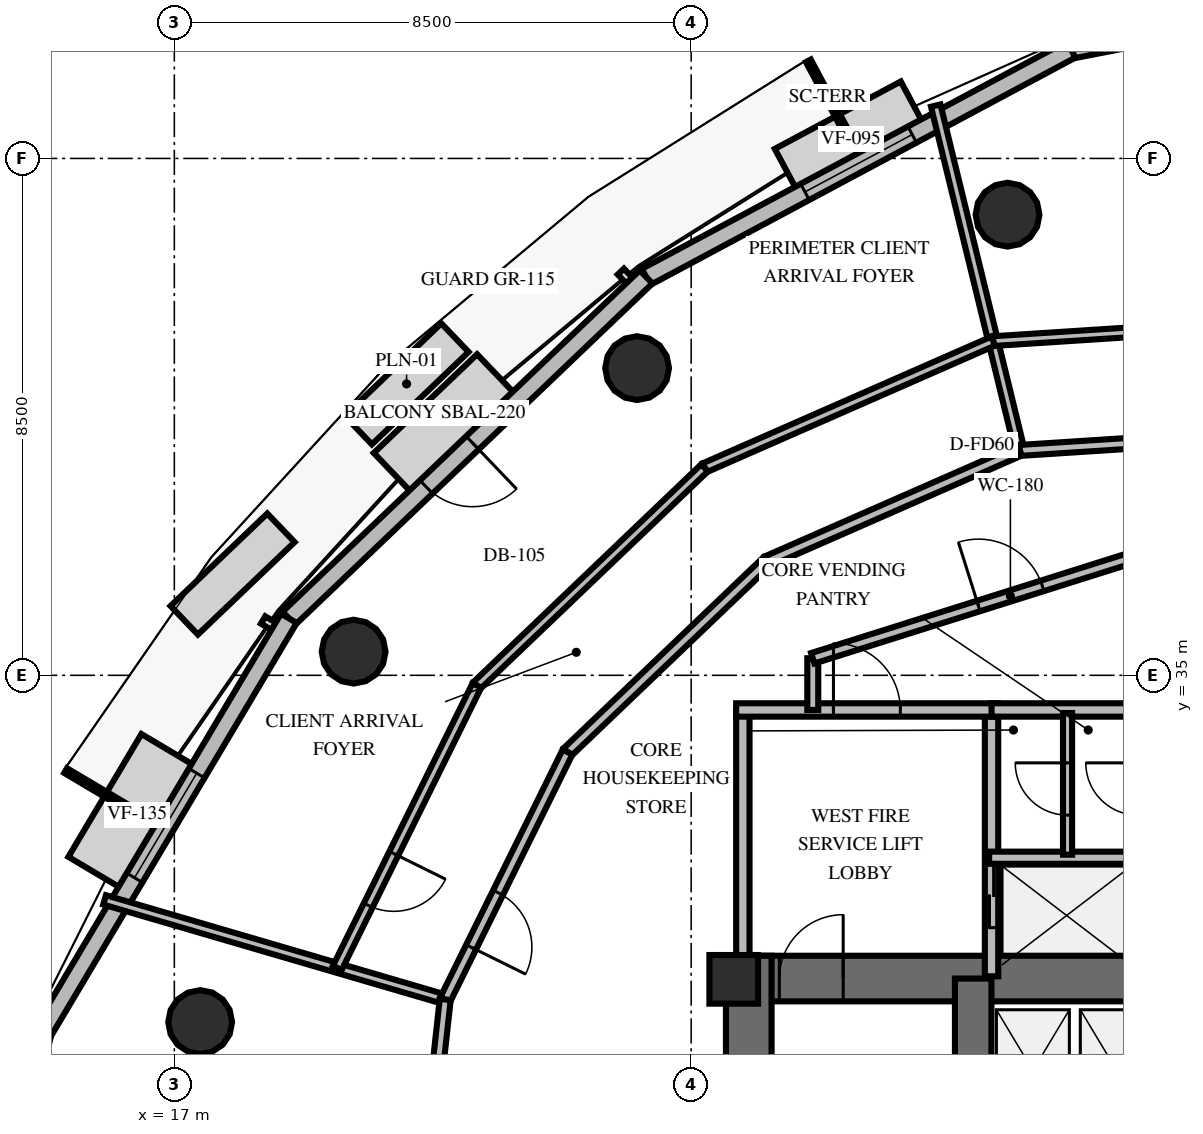
"""IFC4 building model, lengths in metres.
Left out: names, types, materials, properties, quantities, classifications, styles, units other than length and angle.
Written with IfcOpenShell. Run it as: python <this file> out.ifc"""

import sys

from ifc_helpers import new_model, si_unit, direction, frame, frame_2d, origin, origin_2d, place, context, subcontext, project, spatial, rectangle, circle, extrude, element, fill, save


model = new_model("IFC4")
c1 = context("Model", 3, precision=1e-05, world=origin(), true_north=direction((0.0, 1.0)))
c2 = subcontext(c1, "Body", "Model", "MODEL_VIEW")
j1 = project(units=[si_unit("LENGTHUNIT", "METRE"), si_unit("PLANEANGLEUNIT", "RADIAN")], contexts=[c1])
p1 = place(None, origin())
s1 = spatial("IfcSite", under=j1, at=p1, CompositionType="ELEMENT")
p2 = place(p1, origin())
s2 = spatial("IfcBuilding", under=s1, at=p2, CompositionType="ELEMENT")
p3 = place(p2, frame((0.0, 0.0, 213.2)))
s3 = spatial("IfcBuildingStorey", under=s2, at=p3, CompositionType="ELEMENT", Elevation=213.2)
p4 = place(p3, frame((26.072, 30.013, 0.0), z_axis=(0.0, 0.0, 1.0), x_axis=(1.0, 0.0, 0.0)))
e1 = element("IfcWall", 1, at=p4, inside=s3, PredefinedType="SHEAR", context=c2, shape_type="SweptSolid", body=[
    extrude(rectangle(XDim=15.866, YDim=0.75, at=frame_2d((7.933, 0.0))), origin(), (0.0, 0.0, 1.0), 3.6),
])
p5 = place(p4, frame((0.878, 0.0, 0.0)))
e2 = element("IfcOpeningElement", 2, at=p5, cuts=e1, PredefinedType="OPENING", context=c2, shape_type="SweptSolid", body=[
    extrude(rectangle(XDim=1.05, YDim=2.15, at=frame_2d((0.525, 1.075))), frame((0.0, 0.385, 0.0), z_axis=(0.0, -1.0, 0.0), x_axis=(1.0, 0.0, 0.0)), (0.0, 0.0, 1.0), 0.77),
])
p6 = place(p4, frame((13.928, 0.0, 0.0)))
e3 = element("IfcOpeningElement", 3, at=p6, cuts=e1, PredefinedType="OPENING", context=c2, shape_type="SweptSolid", body=[
    extrude(rectangle(XDim=1.05, YDim=2.15, at=frame_2d((0.525, 1.075))), frame((0.0, 0.385, 0.0), z_axis=(0.0, -1.0, 0.0), x_axis=(1.0, 0.0, 0.0)), (0.0, 0.0, 1.0), 0.77),
])
p7 = place(p4, frame((7.378, 0.0, 0.0)))
e4 = element("IfcOpeningElement", 4, at=p7, cuts=e1, PredefinedType="OPENING", context=c2, shape_type="SweptSolid", body=[
    extrude(rectangle(XDim=1.1, YDim=2.15, at=frame_2d((0.55, 1.075))), frame((0.0, 0.385, 0.0), z_axis=(0.0, -1.0, 0.0), x_axis=(1.0, 0.0, 0.0)), (0.0, 0.0, 1.0), 0.77),
])
p8 = place(p3, frame((26.447, 19.812, 0.0), z_axis=(0.0, 0.0, 1.0), x_axis=(0.0, 1.0, 0.0)))
e5 = element("IfcWall", 5, at=p8, inside=s3, PredefinedType="SHEAR", context=c2, shape_type="SweptSolid", body=[
    extrude(rectangle(XDim=10.576, YDim=0.75, at=frame_2d((5.288, 0.0))), origin(), (0.0, 0.0, 1.0), 3.6),
])
p9 = place(p3, frame((30.138, 20.187, 0.0), z_axis=(0.0, 0.0, 1.0), x_axis=(0.0, 1.0, 0.0)))
e6 = element("IfcWall", 6, at=p9, inside=s3, PredefinedType="SHEAR", context=c2, shape_type="SweptSolid", body=[
    extrude(rectangle(XDim=9.826, YDim=0.6, at=frame_2d((4.913, 0.0))), origin(), (0.0, 0.0, 1.0), 3.6),
])
p10 = place(p3, frame((26.2, 30.0, 0.0), z_axis=(0.0, 0.0, 1.0), x_axis=(1.0, 0.0, 0.0)))
e7 = element("IfcColumn", 7, at=p10, inside=s3, PredefinedType="PILASTER", context=c2, shape_type="SweptSolid", body=[
    extrude(rectangle(XDim=0.8, YDim=0.8, at=origin_2d()), origin(), (0.0, 0.0, 1.0), 3.6),
])
for number, where, z_axis, x_axis in (
    (8, (30.703, 42.575, 0.0), (0.0, 0.0, 1.0), (1.0, 0.0, 0.0)),
    (9, (24.611, 40.052, 0.0), (0.0, 0.0, 1.0), (1.0, 0.0, 0.0)),
    (10, (19.948, 35.389, 0.0), (0.0, 0.0, 1.0), (1.0, 0.0, 0.0)),
    (11, (17.425, 29.297, 0.0), (0.0, 0.0, 1.0), (1.0, 0.0, 0.0)),
):
    element("IfcColumn", number, at=place(p3, frame(where, z_axis=z_axis, x_axis=x_axis)), inside=s3, PredefinedType="COLUMN", context=c2, shape_type="SweptSolid", body=[
        extrude(circle(Radius=0.525, at=origin_2d()), origin(), (0.0, 0.0, 1.0), 3.6),
    ])
p11 = place(p3, frame((39.01, 46.703, 0.0), z_axis=(0.0, 0.0, 1.0), x_axis=(-0.9816114389, -0.190889976216, 0.0)))
e12 = element("IfcWall", 12, at=p11, inside=s3, PredefinedType="SOLIDWALL", context=c2, shape_type="SweptSolid", body=[
    extrude(rectangle(XDim=7.397, YDim=0.3, at=frame_2d((3.699, 0.0))), origin(), (0.0, 0.0, 1.0), 2.66),
])
p12 = place(p11, frame((2.699, 0.0, 0.8)))
e13 = element("IfcOpeningElement", 13, at=p12, cuts=e12, PredefinedType="OPENING", context=c2, shape_type="SweptSolid", body=[
    extrude(rectangle(XDim=2.0, YDim=1.85, at=frame_2d((1.0, 0.925))), frame((0.0, 0.16, 0.0), z_axis=(0.0, -1.0, 0.0), x_axis=(1.0, 0.0, 0.0)), (0.0, 0.0, 1.0), 0.32),
])
p13 = place(p3, frame((31.749, 45.291, 0.0), z_axis=(0.0, 0.0, 1.0), x_axis=(-0.881775109683, -0.47167007107, 0.0)))
e14 = element("IfcWall", 14, at=p13, inside=s3, PredefinedType="SOLIDWALL", context=c2, shape_type="SweptSolid", body=[
    extrude(rectangle(XDim=7.927, YDim=0.3, at=frame_2d((3.964, 0.0))), origin(), (0.0, 0.0, 1.0), 2.66),
])
p14 = place(p13, frame((2.964, 0.0, 0.8)))
e15 = element("IfcOpeningElement", 15, at=p14, cuts=e14, PredefinedType="OPENING", context=c2, shape_type="SweptSolid", body=[
    extrude(rectangle(XDim=2.0, YDim=1.85, at=frame_2d((1.0, 0.925))), frame((0.0, 0.16, 0.0), z_axis=(0.0, -1.0, 0.0), x_axis=(1.0, 0.0, 0.0)), (0.0, 0.0, 1.0), 0.32),
])
p15 = place(p3, frame((24.759, 41.552, 0.0), z_axis=(0.0, 0.0, 1.0), x_axis=(-0.722981687911, -0.690867193421, 0.0)))
e16 = element("IfcWall", 16, at=p15, inside=s3, PredefinedType="SOLIDWALL", context=c2, shape_type="SweptSolid", body=[
    extrude(rectangle(XDim=8.127, YDim=0.3, at=frame_2d((4.063, 0.0))), origin(), (0.0, 0.0, 1.0), 2.66),
])
p16 = place(p15, frame((3.95, 0.0, 0.0)))
e17 = element("IfcOpeningElement", 17, at=p16, cuts=e16, PredefinedType="OPENING", context=c2, shape_type="SweptSolid", body=[
    extrude(rectangle(XDim=1.05, YDim=2.15, at=frame_2d((0.525, 1.075))), frame((0.0, 0.16, 0.0), z_axis=(0.0, -1.0, 0.0), x_axis=(1.0, 0.0, 0.0)), (0.0, 0.0, 1.0), 0.32),
])
p17 = place(p3, frame((18.883, 35.937, 0.0), z_axis=(0.0, 0.0, 1.0), x_axis=(-0.511158411117, -0.859486520397, 0.0)))
e18 = element("IfcWall", 18, at=p17, inside=s3, PredefinedType="SOLIDWALL", context=c2, shape_type="SweptSolid", body=[
    extrude(rectangle(XDim=7.927, YDim=0.3, at=frame_2d((3.963, 0.0))), origin(), (0.0, 0.0, 1.0), 2.66),
])
p18 = place(p17, frame((2.964, 0.0, 0.8)))
e19 = element("IfcOpeningElement", 19, at=p18, cuts=e18, PredefinedType="OPENING", context=c2, shape_type="SweptSolid", body=[
    extrude(rectangle(XDim=2.0, YDim=1.85, at=frame_2d((1.0, 0.925))), frame((0.0, 0.16, 0.0), z_axis=(0.0, -1.0, 0.0), x_axis=(1.0, 0.0, 0.0)), (0.0, 0.0, 1.0), 0.32),
])
p19 = place(p3, frame((26.35, 30.05, 0.0), z_axis=(0.0, 0.0, 1.0), x_axis=(0.0, 1.0, 0.0)))
e20 = element("IfcWall", 20, at=p19, inside=s3, PredefinedType="SOLIDWALL", context=c2, shape_type="SweptSolid", body=[
    extrude(rectangle(XDim=4.38, YDim=0.22, at=frame_2d((2.19, 0.0))), origin(), (0.0, 0.0, 1.0), 2.46),
])
p20 = place(p3, frame((30.44, 30.05, 0.0), z_axis=(0.0, 0.0, 1.0), x_axis=(0.0, 1.0, 0.0)))
e21 = element("IfcWall", 21, at=p20, inside=s3, PredefinedType="SOLIDWALL", context=c2, shape_type="SweptSolid", body=[
    extrude(rectangle(XDim=4.38, YDim=0.22, at=frame_2d((2.19, 0.0))), origin(), (0.0, 0.0, 1.0), 2.46),
])
p21 = place(p20, frame((0.8, 0.0, 0.0)))
e22 = element("IfcOpeningElement", 22, at=p21, cuts=e21, PredefinedType="OPENING", context=c2, shape_type="SweptSolid", body=[
    extrude(rectangle(XDim=1.05, YDim=2.1, at=frame_2d((0.525, 1.05))), frame((0.0, 0.12, 0.0), z_axis=(0.0, -1.0, 0.0), x_axis=(1.0, 0.0, 0.0)), (0.0, 0.0, 1.0), 0.24),
])
p22 = place(p3, frame((26.24, 34.43, 0.0), z_axis=(0.0, 0.0, 1.0), x_axis=(1.0, 0.0, 0.0)))
e23 = element("IfcWall", 23, at=p22, inside=s3, PredefinedType="SOLIDWALL", context=c2, shape_type="SweptSolid", body=[
    extrude(rectangle(XDim=4.31, YDim=0.22, at=frame_2d((2.155, 0.0))), origin(), (0.0, 0.0, 1.0), 2.46),
])
p23 = place(p22, frame((1.6, 0.0, 0.0)))
e24 = element("IfcOpeningElement", 24, at=p23, cuts=e23, PredefinedType="OPENING", context=c2, shape_type="SweptSolid", body=[
    extrude(rectangle(XDim=1.1, YDim=2.15, at=frame_2d((0.55, 1.075))), frame((0.0, 0.12, 0.0), z_axis=(0.0, -1.0, 0.0), x_axis=(1.0, 0.0, 0.0)), (0.0, 0.0, 1.0), 0.24),
])
p24 = place(p3, frame((30.4, 32.0, 0.0), z_axis=(0.0, 0.0, 1.0), x_axis=(1.0, 0.0, 0.0)))
e25 = element("IfcWall", 25, at=p24, inside=s3, PredefinedType="SOLIDWALL", context=c2, shape_type="SweptSolid", body=[
    extrude(rectangle(XDim=2.55, YDim=0.2, at=frame_2d((1.275, 0.0))), origin(), (0.0, 0.0, 1.0), 2.46),
])
p25 = place(p3, frame((30.44, 34.43, 0.0), z_axis=(0.0, 0.0, 1.0), x_axis=(1.0, 0.0, 0.0)))
e26 = element("IfcWall", 26, at=p25, inside=s3, PredefinedType="SOLIDWALL", context=c2, shape_type="SweptSolid", body=[
    extrude(rectangle(XDim=7.12, YDim=0.22, at=frame_2d((3.56, 0.0))), origin(), (0.0, 0.0, 1.0), 2.46),
])
p26 = place(p25, frame((3.01, 0.0, 0.0)))
e27 = element("IfcOpeningElement", 27, at=p26, cuts=e26, PredefinedType="OPENING", context=c2, shape_type="SweptSolid", body=[
    extrude(rectangle(XDim=1.1, YDim=2.15, at=frame_2d((0.55, 1.075))), frame((0.0, 0.12, 0.0), z_axis=(0.0, -1.0, 0.0), x_axis=(1.0, 0.0, 0.0)), (0.0, 0.0, 1.0), 0.24),
])
p27 = place(p3, frame((31.69, 32.05, 0.0), z_axis=(0.0, 0.0, 1.0), x_axis=(0.0, 1.0, 0.0)))
e28 = element("IfcWall", 28, at=p27, inside=s3, PredefinedType="PARTITIONING", context=c2, shape_type="SweptSolid", body=[
    extrude(rectangle(XDim=2.33, YDim=0.15, at=frame_2d((1.165, 0.0))), origin(), (0.0, 0.0, 1.0), 2.46),
])
p28 = place(p27, frame((0.65, 0.0, 0.0)))
e29 = element("IfcOpeningElement", 29, at=p28, cuts=e28, PredefinedType="OPENING", context=c2, shape_type="SweptSolid", body=[
    extrude(rectangle(XDim=0.86, YDim=2.05, at=frame_2d((0.43, 1.025))), frame((0.0, 0.085, 0.0), z_axis=(0.0, -1.0, 0.0), x_axis=(1.0, 0.0, 0.0)), (0.0, 0.0, 1.0), 0.17),
])
p29 = place(p3, frame((27.5, 34.43, 0.0), z_axis=(0.0, 0.0, 1.0), x_axis=(0.0, 1.0, 0.0)))
e30 = element("IfcWall", 30, at=p29, inside=s3, PredefinedType="PARTITIONING", context=c2, shape_type="SweptSolid", body=[
    extrude(rectangle(XDim=0.85, YDim=0.18, at=frame_2d((0.425, 0.0))), origin(), (0.0, 0.0, 1.0), 2.46),
])
p30 = place(p3, frame((27.5, 35.28, 0.0), z_axis=(0.0, 0.0, 1.0), x_axis=(0.953691418528, 0.300786765376, 0.0)))
e31 = element("IfcWall", 31, at=p30, inside=s3, PredefinedType="PARTITIONING", context=c2, shape_type="SweptSolid", body=[
    extrude(rectangle(XDim=6.816, YDim=0.18, at=frame_2d((3.408, 0.0))), origin(), (0.0, 0.0, 1.0), 2.46),
])
p31 = place(p30, frame((2.858, 0.0, 0.0)))
e32 = element("IfcOpeningElement", 32, at=p31, cuts=e31, PredefinedType="OPENING", context=c2, shape_type="SweptSolid", body=[
    extrude(rectangle(XDim=1.1, YDim=2.15, at=frame_2d((0.55, 1.075))), frame((0.0, 0.1, 0.0), z_axis=(0.0, -1.0, 0.0), x_axis=(1.0, 0.0, 0.0)), (0.0, 0.0, 1.0), 0.2),
])
p32 = place(p3, frame((30.905, 38.698, 0.0), z_axis=(0.0, 0.0, 1.0), x_axis=(-0.236843531304, 0.971547807202, 0.0)))
e33 = element("IfcWall", 33, at=p32, inside=s3, PredefinedType="PARTITIONING", context=c2, shape_type="SweptSolid", body=[
    extrude(rectangle(XDim=5.837, YDim=0.16, at=frame_2d((2.919, 0.0))), origin(), (0.0, 0.0, 1.0), 2.46),
])
p33 = place(p3, frame((35.434, 38.991, 0.0), z_axis=(0.0, 0.0, 1.0), x_axis=(-0.997911351123, -0.064598260804, 0.0)))
e34 = element("IfcWall", 34, at=p33, inside=s3, PredefinedType="PARTITIONING", context=c2, shape_type="SweptSolid", body=[
    extrude(rectangle(XDim=4.539, YDim=0.18, at=frame_2d((2.27, 0.0))), origin(), (0.0, 0.0, 1.0), 2.46),
])
p34 = place(p33, frame((0.96, 0.0, 0.0)))
e35 = element("IfcOpeningElement", 35, at=p34, cuts=e34, PredefinedType="OPENING", context=c2, shape_type="SweptSolid", body=[
    extrude(rectangle(XDim=1.0, YDim=2.15, at=frame_2d((0.5, 1.075))), frame((0.0, 0.1, 0.0), z_axis=(0.0, -1.0, 0.0), x_axis=(1.0, 0.0, 0.0)), (0.0, 0.0, 1.0), 0.2),
])
p35 = place(p3, frame((35.637, 40.83, 0.0), z_axis=(0.0, 0.0, 1.0), x_axis=(-0.99791758747, -0.064501849728, 0.0)))
e36 = element("IfcWall", 36, at=p35, inside=s3, PredefinedType="PARTITIONING", context=c2, shape_type="SweptSolid", body=[
    extrude(rectangle(XDim=5.182, YDim=0.16, at=frame_2d((2.591, 0.0))), origin(), (0.0, 0.0, 1.0), 2.46),
])
p36 = place(p35, frame((1.148, 0.0, 0.0)))
e37 = element("IfcOpeningElement", 37, at=p36, cuts=e36, PredefinedType="OPENING", context=c2, shape_type="SweptSolid", body=[
    extrude(rectangle(XDim=0.95, YDim=2.15, at=frame_2d((0.475, 1.075))), frame((0.0, 0.09, 0.0), z_axis=(0.0, -1.0, 0.0), x_axis=(1.0, 0.0, 0.0)), (0.0, 0.0, 1.0), 0.18),
])
p37 = place(p3, frame((21.455, 29.668, 0.0), z_axis=(0.0, 0.0, 1.0), x_axis=(-0.95979926175, 0.280687329859, 0.0)))
e38 = element("IfcWall", 38, at=p37, inside=s3, PredefinedType="PARTITIONING", context=c2, shape_type="SweptSolid", body=[
    extrude(rectangle(XDim=5.837, YDim=0.16, at=frame_2d((2.918, 0.0))), origin(), (0.0, 0.0, 1.0), 2.46),
])
p38 = place(p3, frame((30.905, 38.698, 0.0), z_axis=(0.0, 0.0, 1.0), x_axis=(-0.915662861199, -0.401947166455, 0.0)))
e39 = element("IfcWall", 39, at=p38, inside=s3, PredefinedType="PARTITIONING", context=c2, shape_type="SweptSolid", body=[
    extrude(rectangle(XDim=4.539, YDim=0.18, at=frame_2d((2.27, 0.0))), origin(), (0.0, 0.0, 1.0), 2.46),
])
p39 = place(p3, frame((26.748, 36.874, 0.0), z_axis=(0.0, 0.0, 1.0), x_axis=(-0.722979348147, -0.690869641939, 0.0)))
e40 = element("IfcWall", 40, at=p39, inside=s3, PredefinedType="PARTITIONING", context=c2, shape_type="SweptSolid", body=[
    extrude(rectangle(XDim=4.539, YDim=0.18, at=frame_2d((2.27, 0.0))), origin(), (0.0, 0.0, 1.0), 2.46),
])
p40 = place(p3, frame((23.467, 33.738, 0.0), z_axis=(0.0, 0.0, 1.0), x_axis=(-0.443078163256, -0.896482984359, 0.0)))
e41 = element("IfcWall", 41, at=p40, inside=s3, PredefinedType="PARTITIONING", context=c2, shape_type="SweptSolid", body=[
    extrude(rectangle(XDim=4.539, YDim=0.18, at=frame_2d((2.27, 0.0))), origin(), (0.0, 0.0, 1.0), 2.46),
])
p41 = place(p40, frame((2.579, 0.0, 0.0)))
e42 = element("IfcOpeningElement", 42, at=p41, cuts=e41, PredefinedType="OPENING", context=c2, shape_type="SweptSolid", body=[
    extrude(rectangle(XDim=1.0, YDim=2.15, at=frame_2d((0.5, 1.075))), frame((0.0, 0.1, 0.0), z_axis=(0.0, -1.0, 0.0), x_axis=(1.0, 0.0, 0.0)), (0.0, 0.0, 1.0), 0.2),
])
for number, where, z_axis, x_axis in (
    (43, (30.466, 40.496, 0.0), (0.0, 0.0, 1.0), (-0.916, -0.402, 0.0)),
    (44, (25.722, 38.413, 0.0), (0.0, 0.0, 1.0), (-0.723, -0.691, 0.0)),
):
    element("IfcWall", number, at=place(p3, frame(where, z_axis=z_axis, x_axis=x_axis)), inside=s3, PredefinedType="PARTITIONING", context=c2, shape_type="SweptSolid", body=[
        extrude(rectangle(XDim=5.182, YDim=0.16, at=frame_2d((2.591, 0.0))), origin(), (0.0, 0.0, 1.0), 2.46),
    ])
p42 = place(p3, frame((21.976, 34.833, 0.0), z_axis=(0.0, 0.0, 1.0), x_axis=(-0.443081448287, -0.896481360757, 0.0)))
e45 = element("IfcWall", 45, at=p42, inside=s3, PredefinedType="PARTITIONING", context=c2, shape_type="SweptSolid", body=[
    extrude(rectangle(XDim=5.182, YDim=0.16, at=frame_2d((2.591, 0.0))), origin(), (0.0, 0.0, 1.0), 2.46),
])
p43 = place(p42, frame((3.084, 0.0, 0.0)))
e46 = element("IfcOpeningElement", 46, at=p43, cuts=e45, PredefinedType="OPENING", context=c2, shape_type="SweptSolid", body=[
    extrude(rectangle(XDim=0.95, YDim=2.15, at=frame_2d((0.475, 1.075))), frame((0.0, 0.09, 0.0), z_axis=(0.0, -1.0, 0.0), x_axis=(1.0, 0.0, 0.0)), (0.0, 0.0, 1.0), 0.18),
])
p44 = place(p3, frame((21.455, 29.668, 0.0), z_axis=(0.0, 0.0, 1.0), x_axis=(-0.109723099248, -0.99396219319, 0.0)))
e47 = element("IfcWall", 47, at=p44, inside=s3, PredefinedType="PARTITIONING", context=c2, shape_type="SweptSolid", body=[
    extrude(rectangle(XDim=4.539, YDim=0.18, at=frame_2d((2.27, 0.0))), origin(), (0.0, 0.0, 1.0), 2.46),
])
p45 = place(p44, frame((2.579, 0.0, 0.0)))
e48 = element("IfcOpeningElement", 48, at=p45, cuts=e47, PredefinedType="OPENING", context=c2, shape_type="SweptSolid", body=[
    extrude(rectangle(XDim=1.0, YDim=2.15, at=frame_2d((0.5, 1.075))), frame((0.0, 0.1, 0.0), z_axis=(0.0, -1.0, 0.0), x_axis=(1.0, 0.0, 0.0)), (0.0, 0.0, 1.0), 0.2),
])
p46 = place(p14, origin())
e49 = element("IfcWindow", 49, at=p46, inside=s3, PartitioningType="SINGLE_PANEL", PredefinedType="WINDOW", context=c2, shape_type="SweptSolid", body=[
    extrude(rectangle(XDim=2.0, YDim=1.85, at=frame_2d((1.0, 0.925))), frame((0.0, 0.03, 0.0), z_axis=(0.0, -1.0, 0.0), x_axis=(1.0, 0.0, 0.0)), (0.0, 0.0, 1.0), 0.06),
])
fill(e15, e49)
p47 = place(p16, origin())
e50 = element("IfcDoor", 50, at=p47, inside=s3, OperationType="SINGLE_SWING_LEFT", PredefinedType="DOOR", context=c2, shape_type="SweptSolid", body=[
    extrude(rectangle(XDim=1.05, YDim=2.15, at=frame_2d((0.525, 1.075))), frame((0.0, 0.025, 0.0), z_axis=(0.0, -1.0, 0.0), x_axis=(1.0, 0.0, 0.0)), (0.0, 0.0, 1.0), 0.05),
])
fill(e17, e50)
p48 = place(p18, origin())
e51 = element("IfcWindow", 51, at=p48, inside=s3, PartitioningType="SINGLE_PANEL", PredefinedType="WINDOW", context=c2, shape_type="SweptSolid", body=[
    extrude(rectangle(XDim=2.0, YDim=1.85, at=frame_2d((1.0, 0.925))), frame((0.0, 0.03, 0.0), z_axis=(0.0, -1.0, 0.0), x_axis=(1.0, 0.0, 0.0)), (0.0, 0.0, 1.0), 0.06),
])
fill(e19, e51)
p49 = place(p5, origin())
e52 = element("IfcDoor", 52, at=p49, inside=s3, OperationType="SINGLE_SWING_RIGHT", PredefinedType="DOOR", context=c2, shape_type="SweptSolid", body=[
    extrude(rectangle(XDim=1.05, YDim=2.15, at=frame_2d((0.525, 1.075))), frame((0.0, 0.025, 0.0), z_axis=(0.0, -1.0, 0.0), x_axis=(1.0, 0.0, 0.0)), (0.0, 0.0, 1.0), 0.05),
])
fill(e2, e52)
p50 = place(p23, origin())
e53 = element("IfcDoor", 53, at=p50, inside=s3, OperationType="SINGLE_SWING_LEFT", PredefinedType="DOOR", context=c2, shape_type="SweptSolid", body=[
    extrude(rectangle(XDim=1.1, YDim=2.15, at=frame_2d((0.55, 1.075))), frame((0.0, 0.025, 0.0), z_axis=(0.0, -1.0, 0.0), x_axis=(1.0, 0.0, 0.0)), (0.0, 0.0, 1.0), 0.05),
])
fill(e24, e53)
p51 = place(p21, origin())
e54 = element("IfcDoor", 54, at=p51, inside=s3, OperationType="DOUBLE_DOOR_SLIDING", PredefinedType="USERDEFINED", context=c2, shape_type="SweptSolid", body=[
    extrude(rectangle(XDim=1.05, YDim=2.1, at=frame_2d((0.525, 1.05))), frame((0.0, 0.025, 0.0), z_axis=(0.0, -1.0, 0.0), x_axis=(1.0, 0.0, 0.0)), (0.0, 0.0, 1.0), 0.05),
])
fill(e22, e54)
p52 = place(p28, origin())
e55 = element("IfcDoor", 55, at=p52, inside=s3, OperationType="SINGLE_SWING_RIGHT", PredefinedType="TRAPDOOR", context=c2, shape_type="SweptSolid", body=[
    extrude(rectangle(XDim=0.86, YDim=2.05, at=frame_2d((0.43, 1.025))), frame((0.0, 0.025, 0.0), z_axis=(0.0, -1.0, 0.0), x_axis=(1.0, 0.0, 0.0)), (0.0, 0.0, 1.0), 0.05),
])
fill(e29, e55)
p53 = place(p31, origin())
e56 = element("IfcDoor", 56, at=p53, inside=s3, OperationType="SINGLE_SWING_LEFT", PredefinedType="DOOR", context=c2, shape_type="SweptSolid", body=[
    extrude(rectangle(XDim=1.1, YDim=2.15, at=frame_2d((0.55, 1.075))), frame((0.0, 0.025, 0.0), z_axis=(0.0, -1.0, 0.0), x_axis=(1.0, 0.0, 0.0)), (0.0, 0.0, 1.0), 0.05),
])
fill(e32, e56)
p54 = place(p41, origin())
e57 = element("IfcDoor", 57, at=p54, inside=s3, OperationType="SINGLE_SWING_RIGHT", PredefinedType="DOOR", context=c2, shape_type="SweptSolid", body=[
    extrude(rectangle(XDim=1.0, YDim=2.15, at=frame_2d((0.5, 1.075))), frame((0.0, 0.025, 0.0), z_axis=(0.0, -1.0, 0.0), x_axis=(1.0, 0.0, 0.0)), (0.0, 0.0, 1.0), 0.05),
])
fill(e42, e57)
p55 = place(p43, origin())
e58 = element("IfcDoor", 58, at=p55, inside=s3, OperationType="SINGLE_SWING_LEFT", PredefinedType="DOOR", context=c2, shape_type="SweptSolid", body=[
    extrude(rectangle(XDim=0.95, YDim=2.15, at=frame_2d((0.475, 1.075))), frame((0.0, 0.025, 0.0), z_axis=(0.0, -1.0, 0.0), x_axis=(1.0, 0.0, 0.0)), (0.0, 0.0, 1.0), 0.05),
])
fill(e46, e58)
save(model, sys.argv[1])
